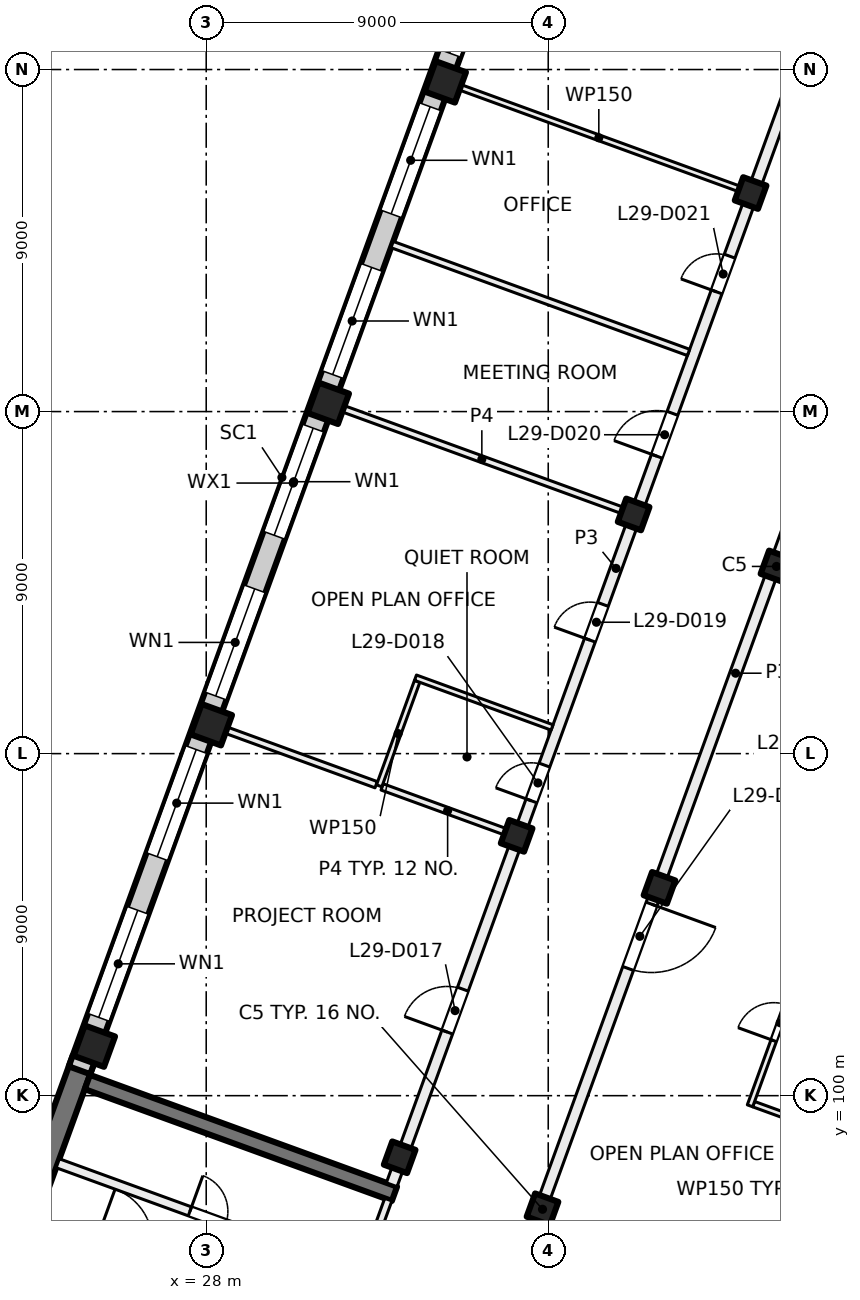
"""IFC4 building model, lengths in metres.
Left out: names, types, materials, properties, quantities, classifications, styles, units other than length and angle.
Written with IfcOpenShell. Run it as: python <this file> out.ifc"""

import sys

from ifc_helpers import new_model, si_unit, direction, frame, frame_2d, origin, origin_2d, place, context, subcontext, project, spatial, rectangle, extrude, element, fill, save


model = new_model("IFC4")
c1 = context("Model", 3, precision=1e-05, world=origin(), true_north=direction((0.0, 1.0)))
c2 = subcontext(c1, "Body", "Model", "MODEL_VIEW")
j1 = project(units=[si_unit("LENGTHUNIT", "METRE"), si_unit("PLANEANGLEUNIT", "RADIAN")], contexts=[c1])
p1 = place(None, origin())
s1 = spatial("IfcSite", under=j1, at=p1, CompositionType="ELEMENT")
p2 = place(p1, origin())
s2 = spatial("IfcBuilding", under=s1, at=p2, CompositionType="ELEMENT")
p3 = place(p2, frame((0.0, 0.0, 125.0)))
s3 = spatial("IfcBuildingStorey", under=s2, at=p3, CompositionType="ELEMENT", Elevation=125.0)
for number, where, z_axis, x_axis in (
    (1, (43.006, 113.925, 0.0), (0.0, 0.0, 1.0), (-0.342, -0.94, 0.0)),
    (2, (39.927, 105.468, 0.0), (0.0, 0.0, 1.0), (-0.342, -0.94, 0.0)),
    (3, (36.849, 97.011, 0.0), (0.0, 0.0, 1.0), (-0.342, -0.94, 0.0)),
    (4, (42.325, 123.751, 0.0), (0.0, 0.0, 1.0), (-0.342, -0.94, 0.0)),
    (5, (39.247, 115.293, 0.0), (0.0, 0.0, 1.0), (-0.342, -0.94, 0.0)),
    (6, (36.169, 106.836, 0.0), (0.0, 0.0, 1.0), (-0.342, -0.94, 0.0)),
    (7, (33.091, 98.379, 0.0), (0.0, 0.0, 1.0), (-0.342, -0.94, 0.0)),
):
    element("IfcColumn", number, at=place(p3, frame(where, z_axis=z_axis, x_axis=x_axis)), inside=s3, PredefinedType="COLUMN", context=c2, shape_type="SweptSolid", body=[
        extrude(rectangle(XDim=0.65, YDim=0.65, at=origin_2d()), origin(), (0.0, 0.0, 1.0), 4.0),
    ])
for number, where, z_axis, x_axis in (
    (8, (34.291, 126.675, 0.0), (0.0, 0.0, 1.0), (-0.342, -0.94, 0.0)),
    (9, (31.212, 118.218, 0.0), (0.0, 0.0, 1.0), (-0.342, -0.94, 0.0)),
    (10, (28.134, 109.76, 0.0), (0.0, 0.0, 1.0), (-0.342, -0.94, 0.0)),
    (11, (25.056, 101.303, 0.0), (0.0, 0.0, 1.0), (-0.342, -0.94, 0.0)),
):
    element("IfcColumn", number, at=place(p3, frame(where, z_axis=z_axis, x_axis=x_axis)), inside=s3, PredefinedType="COLUMN", context=c2, shape_type="SweptSolid", body=[
        extrude(rectangle(XDim=0.85, YDim=0.85, at=origin_2d()), origin(), (0.0, 0.0, 1.0), 4.0),
    ])
p4 = place(p3, frame((21.717, 92.568, 0.0), z_axis=(0.0, 0.0, 1.0), x_axis=(0.342017595281, 0.939693548195, 0.0)))
e12 = element("IfcWall", 12, at=p4, inside=s3, PredefinedType="SHEAR", context=c2, shape_type="SweptSolid", body=[
    extrude(rectangle(XDim=8.925, YDim=0.6, at=frame_2d((4.462, 0.0))), origin(), (0.0, 0.0, 1.0), 4.0),
])
p5 = place(p3, frame((32.953, 97.418, 0.0), z_axis=(0.0, 0.0, 1.0), x_axis=(-0.93969060187, 0.342025690201, 0.0)))
e13 = element("IfcWall", 13, at=p5, inside=s3, PredefinedType="SHEAR", context=c2, shape_type="SweptSolid", body=[
    extrude(rectangle(XDim=8.6, YDim=0.4, at=frame_2d((4.3, 0.0))), origin(), (0.0, 0.0, 1.0), 4.0),
])
p6 = place(p3, frame((24.666, 100.669, 0.0), z_axis=(0.0, 0.0, 1.0), x_axis=(0.34201964167, 0.939692803373, 0.0)))
e14 = element("IfcWall", 14, at=p6, inside=s3, PredefinedType="SOLIDWALL", context=c2, shape_type="SweptSolid", body=[
    extrude(rectangle(XDim=32.884, YDim=0.6, at=frame_2d((16.442, 0.0))), origin(), (0.0, 0.0, 1.0), 3.625),
])
p7 = place(p6, frame((1.48, 0.0, 0.9)))
e15 = element("IfcOpeningElement", 15, at=p7, cuts=e14, PredefinedType="OPENING", context=c2, shape_type="SweptSolid", body=[
    extrude(rectangle(XDim=3.0, YDim=2.4, at=frame_2d((1.5, 1.2))), frame((0.0, 0.31, 0.0), z_axis=(0.0, -1.0, 0.0), x_axis=(1.0, 0.0, 0.0)), (0.0, 0.0, 1.0), 0.62),
])
p8 = place(p6, frame((5.98, 0.0, 0.9)))
e16 = element("IfcOpeningElement", 16, at=p8, cuts=e14, PredefinedType="OPENING", context=c2, shape_type="SweptSolid", body=[
    extrude(rectangle(XDim=3.0, YDim=2.4, at=frame_2d((1.5, 1.2))), frame((0.0, 0.31, 0.0), z_axis=(0.0, -1.0, 0.0), x_axis=(1.0, 0.0, 0.0)), (0.0, 0.0, 1.0), 0.62),
])
p9 = place(p6, frame((10.48, 0.0, 0.9)))
e17 = element("IfcOpeningElement", 17, at=p9, cuts=e14, PredefinedType="OPENING", context=c2, shape_type="SweptSolid", body=[
    extrude(rectangle(XDim=3.0, YDim=2.4, at=frame_2d((1.5, 1.2))), frame((0.0, 0.31, 0.0), z_axis=(0.0, -1.0, 0.0), x_axis=(1.0, 0.0, 0.0)), (0.0, 0.0, 1.0), 0.62),
])
p10 = place(p6, frame((14.98, 0.0, 0.9)))
e18 = element("IfcOpeningElement", 18, at=p10, cuts=e14, PredefinedType="OPENING", context=c2, shape_type="SweptSolid", body=[
    extrude(rectangle(XDim=3.0, YDim=2.4, at=frame_2d((1.5, 1.2))), frame((0.0, 0.31, 0.0), z_axis=(0.0, -1.0, 0.0), x_axis=(1.0, 0.0, 0.0)), (0.0, 0.0, 1.0), 0.62),
])
p11 = place(p6, frame((19.48, 0.0, 0.9)))
e19 = element("IfcOpeningElement", 19, at=p11, cuts=e14, PredefinedType="OPENING", context=c2, shape_type="SweptSolid", body=[
    extrude(rectangle(XDim=3.0, YDim=2.4, at=frame_2d((1.5, 1.2))), frame((0.0, 0.31, 0.0), z_axis=(0.0, -1.0, 0.0), x_axis=(1.0, 0.0, 0.0)), (0.0, 0.0, 1.0), 0.62),
])
p12 = place(p6, frame((23.98, 0.0, 0.9)))
e20 = element("IfcOpeningElement", 20, at=p12, cuts=e14, PredefinedType="OPENING", context=c2, shape_type="SweptSolid", body=[
    extrude(rectangle(XDim=3.0, YDim=2.4, at=frame_2d((1.5, 1.2))), frame((0.0, 0.31, 0.0), z_axis=(0.0, -1.0, 0.0), x_axis=(1.0, 0.0, 0.0)), (0.0, 0.0, 1.0), 0.62),
])
p13 = place(p6, frame((28.48, 0.0, 0.9)))
e21 = element("IfcOpeningElement", 21, at=p13, cuts=e14, PredefinedType="OPENING", context=c2, shape_type="SweptSolid", body=[
    extrude(rectangle(XDim=3.0, YDim=2.4, at=frame_2d((1.5, 1.2))), frame((0.0, 0.31, 0.0), z_axis=(0.0, -1.0, 0.0), x_axis=(1.0, 0.0, 0.0)), (0.0, 0.0, 1.0), 0.62),
])
p14 = place(p3, frame((31.491, 93.693, 0.0), z_axis=(0.0, 0.0, 1.0), x_axis=(0.341995824804, 0.939701471648, 0.0)))
e22 = element("IfcWall", 22, at=p14, inside=s3, PredefinedType="PARTITIONING", context=c2, shape_type="SweptSolid", body=[
    extrude(rectangle(XDim=3.8, YDim=0.2, at=frame_2d((1.9, 0.0))), origin(), (0.0, 0.0, 1.0), 3.625),
])
p15 = place(p14, frame((0.3, 0.0, 0.0)))
e23 = element("IfcOpeningElement", 23, at=p15, cuts=e22, PredefinedType="OPENING", context=c2, shape_type="SweptSolid", body=[
    extrude(rectangle(XDim=1.2, YDim=2.1, at=frame_2d((0.6, 1.05))), frame((0.0, 0.11, 0.0), z_axis=(0.0, -1.0, 0.0), x_axis=(1.0, 0.0, 0.0)), (0.0, 0.0, 1.0), 0.22),
])
p16 = place(p3, frame((23.538, 96.694, 0.0), z_axis=(0.0, 0.0, 1.0), x_axis=(0.939691552312, -0.342023078919, 0.0)))
e24 = element("IfcWall", 24, at=p16, inside=s3, PredefinedType="PARTITIONING", context=c2, shape_type="SweptSolid", body=[
    extrude(rectangle(XDim=8.4, YDim=0.2, at=frame_2d((4.2, 0.0))), origin(), (0.0, 0.0, 1.0), 3.625),
])
p17 = place(p16, frame((1.65, 0.0, 0.0)))
e25 = element("IfcOpeningElement", 25, at=p17, cuts=e24, PredefinedType="OPENING", context=c2, shape_type="SweptSolid", body=[
    extrude(rectangle(XDim=1.5, YDim=2.1, at=frame_2d((0.75, 1.05))), frame((0.0, 0.11, 0.0), z_axis=(0.0, -1.0, 0.0), x_axis=(1.0, 0.0, 0.0)), (0.0, 0.0, 1.0), 0.22),
])
p18 = place(p3, frame((24.094, 98.221, 0.0), z_axis=(0.0, 0.0, 1.0), x_axis=(0.939691552312, -0.342023078919, 0.0)))
e26 = element("IfcWall", 26, at=p18, inside=s3, PredefinedType="PARTITIONING", context=c2, shape_type="SweptSolid", body=[
    extrude(rectangle(XDim=8.4, YDim=0.25, at=frame_2d((4.2, 0.0))), origin(), (0.0, 0.0, 1.0), 3.625),
])
p19 = place(p18, frame((3.7, 0.0, 0.0)))
e27 = element("IfcOpeningElement", 27, at=p19, cuts=e26, PredefinedType="OPENING", context=c2, shape_type="SweptSolid", body=[
    extrude(rectangle(XDim=1.0, YDim=2.1, at=frame_2d((0.5, 1.05))), frame((0.0, 0.135, 0.0), z_axis=(0.0, -1.0, 0.0), x_axis=(1.0, 0.0, 0.0)), (0.0, 0.0, 1.0), 0.27),
])
p20 = place(p3, frame((28.275, 109.709, 0.0), z_axis=(0.0, 0.0, 1.0), x_axis=(0.939727969122, -0.34192300895, 0.0)))
e28 = element("IfcWall", 28, at=p20, inside=s3, PredefinedType="PARTITIONING", context=c2, shape_type="SweptSolid", body=[
    extrude(rectangle(XDim=4.466, YDim=0.175, at=frame_2d((2.233, 0.0))), origin(), (0.0, 0.0, 1.0), 3.625),
])
p21 = place(p3, frame((31.353, 118.166, 0.0), z_axis=(0.0, 0.0, 1.0), x_axis=(0.939687752599, -0.342033518263, 0.0)))
e29 = element("IfcWall", 29, at=p21, inside=s3, PredefinedType="PARTITIONING", context=c2, shape_type="SweptSolid", body=[
    extrude(rectangle(XDim=8.301, YDim=0.175, at=frame_2d((4.15, 0.0))), origin(), (0.0, 0.0, 1.0), 3.625),
])
p22 = place(p3, frame((32.63, 108.124, 0.0), z_axis=(0.0, 0.0, 1.0), x_axis=(0.939692277825, -0.342021085601, 0.0)))
e30 = element("IfcWall", 30, at=p22, inside=s3, PredefinedType="PARTITIONING", context=c2, shape_type="SweptSolid", body=[
    extrude(rectangle(XDim=3.666, YDim=0.175, at=frame_2d((1.833, 0.0))), origin(), (0.0, 0.0, 1.0), 3.625),
])
p23 = place(p3, frame((32.551, 108.153, 0.0), z_axis=(0.0, 0.0, 1.0), x_axis=(0.341850278959, 0.939754428974, 0.0)))
e31 = element("IfcWall", 31, at=p23, inside=s3, PredefinedType="PARTITIONING", context=c2, shape_type="SweptSolid", body=[
    extrude(rectangle(XDim=2.925, YDim=0.15, at=frame_2d((1.463, 0.0))), origin(), (0.0, 0.0, 1.0), 3.625),
])
p24 = place(p3, frame((32.881, 97.657, 0.0), z_axis=(0.0, 0.0, 1.0), x_axis=(0.342017360004, 0.939693633828, 0.0)))
e32 = element("IfcWall", 32, at=p24, inside=s3, PredefinedType="PARTITIONING", context=c2, shape_type="SweptSolid", body=[
    extrude(rectangle(XDim=34.516, YDim=0.3, at=frame_2d((17.258, 0.0))), origin(), (0.0, 0.0, 1.0), 3.625),
])
p25 = place(p24, frame((4.275, 0.0, 0.0)))
e33 = element("IfcOpeningElement", 33, at=p25, cuts=e32, PredefinedType="OPENING", context=c2, shape_type="SweptSolid", body=[
    extrude(rectangle(XDim=1.2, YDim=2.1, at=frame_2d((0.6, 1.05))), frame((0.0, 0.16, 0.0), z_axis=(0.0, -1.0, 0.0), x_axis=(1.0, 0.0, 0.0)), (0.0, 0.0, 1.0), 0.32),
])
p26 = place(p24, frame((10.75, 0.0, 0.0)))
e34 = element("IfcOpeningElement", 34, at=p26, cuts=e32, PredefinedType="OPENING", context=c2, shape_type="SweptSolid", body=[
    extrude(rectangle(XDim=1.0, YDim=2.1, at=frame_2d((0.5, 1.05))), frame((0.0, 0.16, 0.0), z_axis=(0.0, -1.0, 0.0), x_axis=(1.0, 0.0, 0.0)), (0.0, 0.0, 1.0), 0.32),
])
p27 = place(p24, frame((15.25, 0.0, 0.0)))
e35 = element("IfcOpeningElement", 35, at=p27, cuts=e32, PredefinedType="OPENING", context=c2, shape_type="SweptSolid", body=[
    extrude(rectangle(XDim=1.0, YDim=2.1, at=frame_2d((0.5, 1.05))), frame((0.0, 0.16, 0.0), z_axis=(0.0, -1.0, 0.0), x_axis=(1.0, 0.0, 0.0)), (0.0, 0.0, 1.0), 0.32),
])
p28 = place(p24, frame((20.4, 0.0, 0.0)))
e36 = element("IfcOpeningElement", 36, at=p28, cuts=e32, PredefinedType="OPENING", context=c2, shape_type="SweptSolid", body=[
    extrude(rectangle(XDim=1.2, YDim=2.1, at=frame_2d((0.6, 1.05))), frame((0.0, 0.16, 0.0), z_axis=(0.0, -1.0, 0.0), x_axis=(1.0, 0.0, 0.0)), (0.0, 0.0, 1.0), 0.32),
])
p29 = place(p24, frame((25.0, 0.0, 0.0)))
e37 = element("IfcOpeningElement", 37, at=p29, cuts=e32, PredefinedType="OPENING", context=c2, shape_type="SweptSolid", body=[
    extrude(rectangle(XDim=1.0, YDim=2.1, at=frame_2d((0.5, 1.05))), frame((0.0, 0.16, 0.0), z_axis=(0.0, -1.0, 0.0), x_axis=(1.0, 0.0, 0.0)), (0.0, 0.0, 1.0), 0.32),
])
p30 = place(p3, frame((32.892, 122.395, 0.0), z_axis=(0.0, 0.0, 1.0), x_axis=(0.939684311623, -0.3420429717, 0.0)))
e38 = element("IfcWall", 38, at=p30, inside=s3, PredefinedType="PARTITIONING", context=c2, shape_type="SweptSolid", body=[
    extrude(rectangle(XDim=8.301, YDim=0.175, at=frame_2d((4.15, 0.0))), origin(), (0.0, 0.0, 1.0), 3.625),
])
p31 = place(p3, frame((33.507, 110.998, 0.0), z_axis=(0.0, 0.0, 1.0), x_axis=(0.939610657605, -0.342245251415, 0.0)))
e39 = element("IfcWall", 39, at=p31, inside=s3, PredefinedType="PARTITIONING", context=c2, shape_type="SweptSolid", body=[
    extrude(rectangle(XDim=3.825, YDim=0.15, at=frame_2d((1.913, 0.0))), origin(), (0.0, 0.0, 1.0), 3.625),
])
p32 = place(p3, frame((46.282, 98.367, 0.0), z_axis=(0.0, 0.0, 1.0), x_axis=(-0.939765774653, 0.341819087808, 0.0)))
e40 = element("IfcWall", 40, at=p32, inside=s3, PredefinedType="PARTITIONING", context=c2, shape_type="SweptSolid", body=[
    extrude(rectangle(XDim=4.125, YDim=0.15, at=frame_2d((2.063, 0.0))), origin(), (0.0, 0.0, 1.0), 3.625),
])
p33 = place(p3, frame((42.309, 99.733, 0.0), z_axis=(0.0, 0.0, 1.0), x_axis=(0.342023551531, 0.939691380293, 0.0)))
e41 = element("IfcWall", 41, at=p33, inside=s3, PredefinedType="PARTITIONING", context=c2, shape_type="SweptSolid", body=[
    extrude(rectangle(XDim=13.488, YDim=0.15, at=frame_2d((6.744, 0.0))), origin(), (0.0, 0.0, 1.0), 3.625),
])
p34 = place(p33, frame((1.825, 0.0, 0.0)))
e42 = element("IfcOpeningElement", 42, at=p34, cuts=e41, PredefinedType="OPENING", context=c2, shape_type="SweptSolid", body=[
    extrude(rectangle(XDim=1.0, YDim=2.1, at=frame_2d((0.5, 1.05))), frame((0.0, 0.085, 0.0), z_axis=(0.0, -1.0, 0.0), x_axis=(1.0, 0.0, 0.0)), (0.0, 0.0, 1.0), 0.17),
])
p35 = place(p33, frame((6.325, 0.0, 0.0)))
e43 = element("IfcOpeningElement", 43, at=p35, cuts=e41, PredefinedType="OPENING", context=c2, shape_type="SweptSolid", body=[
    extrude(rectangle(XDim=1.0, YDim=2.1, at=frame_2d((0.5, 1.05))), frame((0.0, 0.085, 0.0), z_axis=(0.0, -1.0, 0.0), x_axis=(1.0, 0.0, 0.0)), (0.0, 0.0, 1.0), 0.17),
])
p36 = place(p33, frame((10.791, 0.0, 0.0)))
e44 = element("IfcOpeningElement", 44, at=p36, cuts=e41, PredefinedType="OPENING", context=c2, shape_type="SweptSolid", body=[
    extrude(rectangle(XDim=1.0, YDim=2.1, at=frame_2d((0.5, 1.05))), frame((0.0, 0.085, 0.0), z_axis=(0.0, -1.0, 0.0), x_axis=(1.0, 0.0, 0.0)), (0.0, 0.0, 1.0), 0.17),
])
p37 = place(p3, frame((42.231, 123.785, 0.0), z_axis=(0.0, 0.0, 1.0), x_axis=(-0.939687752599, 0.342033518263, 0.0)))
e45 = element("IfcWall", 45, at=p37, inside=s3, PredefinedType="PARTITIONING", context=c2, shape_type="SweptSolid", body=[
    extrude(rectangle(XDim=8.301, YDim=0.15, at=frame_2d((4.15, 0.0))), origin(), (0.0, 0.0, 1.0), 3.625),
])
p38 = place(p3, frame((43.1, 113.891, 0.0), z_axis=(0.0, 0.0, 1.0), x_axis=(0.939670544866, -0.342080790328, 0.0)))
e46 = element("IfcWall", 46, at=p38, inside=s3, PredefinedType="PARTITIONING", context=c2, shape_type="SweptSolid", body=[
    extrude(rectangle(XDim=8.3, YDim=0.175, at=frame_2d((4.15, 0.0))), origin(), (0.0, 0.0, 1.0), 3.625),
])
p39 = place(p3, frame((47.314, 125.909, 0.0), z_axis=(0.0, 0.0, 1.0), x_axis=(-0.342010770371, -0.939696032209, 0.0)))
e47 = element("IfcWall", 47, at=p39, inside=s3, PredefinedType="PARTITIONING", context=c2, shape_type="SweptSolid", body=[
    extrude(rectangle(XDim=31.485, YDim=0.3, at=frame_2d((15.742, 0.0))), origin(), (0.0, 0.0, 1.0), 3.625),
])
p40 = place(p39, frame((22.21, 0.0, 0.0)))
e48 = element("IfcOpeningElement", 48, at=p40, cuts=e47, PredefinedType="OPENING", context=c2, shape_type="SweptSolid", body=[
    extrude(rectangle(XDim=1.8, YDim=2.1, at=frame_2d((0.9, 1.05))), frame((0.0, 0.16, 0.0), z_axis=(0.0, -1.0, 0.0), x_axis=(1.0, 0.0, 0.0)), (0.0, 0.0, 1.0), 0.32),
])
p41 = place(p39, frame((9.885, 0.0, 0.0)))
e49 = element("IfcOpeningElement", 49, at=p41, cuts=e47, PredefinedType="OPENING", context=c2, shape_type="SweptSolid", body=[
    extrude(rectangle(XDim=1.2, YDim=2.1, at=frame_2d((0.6, 1.05))), frame((0.0, 0.16, 0.0), z_axis=(0.0, -1.0, 0.0), x_axis=(1.0, 0.0, 0.0)), (0.0, 0.0, 1.0), 0.32),
])
p42 = place(p39, frame((5.484, 0.0, 0.0)))
e50 = element("IfcOpeningElement", 50, at=p42, cuts=e47, PredefinedType="OPENING", context=c2, shape_type="SweptSolid", body=[
    extrude(rectangle(XDim=1.0, YDim=2.1, at=frame_2d((0.5, 1.05))), frame((0.0, 0.16, 0.0), z_axis=(0.0, -1.0, 0.0), x_axis=(1.0, 0.0, 0.0)), (0.0, 0.0, 1.0), 0.32),
])
p43 = place(p7, origin())
e51 = element("IfcWindow", 51, at=p43, inside=s3, PartitioningType="SINGLE_PANEL", PredefinedType="WINDOW", context=c2, shape_type="SweptSolid", body=[
    extrude(rectangle(XDim=3.0, YDim=2.4, at=frame_2d((1.5, 1.2))), frame((0.0, 0.03, 0.0), z_axis=(0.0, -1.0, 0.0), x_axis=(1.0, 0.0, 0.0)), (0.0, 0.0, 1.0), 0.06),
])
fill(e15, e51)
p44 = place(p8, origin())
e52 = element("IfcWindow", 52, at=p44, inside=s3, PartitioningType="SINGLE_PANEL", PredefinedType="WINDOW", context=c2, shape_type="SweptSolid", body=[
    extrude(rectangle(XDim=3.0, YDim=2.4, at=frame_2d((1.5, 1.2))), frame((0.0, 0.03, 0.0), z_axis=(0.0, -1.0, 0.0), x_axis=(1.0, 0.0, 0.0)), (0.0, 0.0, 1.0), 0.06),
])
fill(e16, e52)
p45 = place(p9, origin())
e53 = element("IfcWindow", 53, at=p45, inside=s3, PartitioningType="SINGLE_PANEL", PredefinedType="WINDOW", context=c2, shape_type="SweptSolid", body=[
    extrude(rectangle(XDim=3.0, YDim=2.4, at=frame_2d((1.5, 1.2))), frame((0.0, 0.03, 0.0), z_axis=(0.0, -1.0, 0.0), x_axis=(1.0, 0.0, 0.0)), (0.0, 0.0, 1.0), 0.06),
])
fill(e17, e53)
p46 = place(p10, origin())
e54 = element("IfcWindow", 54, at=p46, inside=s3, PartitioningType="SINGLE_PANEL", PredefinedType="WINDOW", context=c2, shape_type="SweptSolid", body=[
    extrude(rectangle(XDim=3.0, YDim=2.4, at=frame_2d((1.5, 1.2))), frame((0.0, 0.03, 0.0), z_axis=(0.0, -1.0, 0.0), x_axis=(1.0, 0.0, 0.0)), (0.0, 0.0, 1.0), 0.06),
])
fill(e18, e54)
p47 = place(p11, origin())
e55 = element("IfcWindow", 55, at=p47, inside=s3, PartitioningType="SINGLE_PANEL", PredefinedType="WINDOW", context=c2, shape_type="SweptSolid", body=[
    extrude(rectangle(XDim=3.0, YDim=2.4, at=frame_2d((1.5, 1.2))), frame((0.0, 0.03, 0.0), z_axis=(0.0, -1.0, 0.0), x_axis=(1.0, 0.0, 0.0)), (0.0, 0.0, 1.0), 0.06),
])
fill(e19, e55)
p48 = place(p12, origin())
e56 = element("IfcWindow", 56, at=p48, inside=s3, PartitioningType="SINGLE_PANEL", PredefinedType="WINDOW", context=c2, shape_type="SweptSolid", body=[
    extrude(rectangle(XDim=3.0, YDim=2.4, at=frame_2d((1.5, 1.2))), frame((0.0, 0.03, 0.0), z_axis=(0.0, -1.0, 0.0), x_axis=(1.0, 0.0, 0.0)), (0.0, 0.0, 1.0), 0.06),
])
fill(e20, e56)
p49 = place(p13, origin())
e57 = element("IfcWindow", 57, at=p49, inside=s3, PartitioningType="SINGLE_PANEL", PredefinedType="WINDOW", context=c2, shape_type="SweptSolid", body=[
    extrude(rectangle(XDim=3.0, YDim=2.4, at=frame_2d((1.5, 1.2))), frame((0.0, 0.03, 0.0), z_axis=(0.0, -1.0, 0.0), x_axis=(1.0, 0.0, 0.0)), (0.0, 0.0, 1.0), 0.06),
])
fill(e21, e57)
p50 = place(p19, origin())
e58 = element("IfcDoor", 58, at=p50, inside=s3, OperationType="SINGLE_SWING_LEFT", PredefinedType="DOOR", context=c2, shape_type="SweptSolid", body=[
    extrude(rectangle(XDim=1.0, YDim=2.1, at=frame_2d((0.5, 1.05))), frame((0.0, 0.025, 0.0), z_axis=(0.0, -1.0, 0.0), x_axis=(1.0, 0.0, 0.0)), (0.0, 0.0, 1.0), 0.05),
])
fill(e27, e58)
p51 = place(p25, origin())
e59 = element("IfcDoor", 59, at=p51, inside=s3, OperationType="DOUBLE_DOOR_SINGLE_SWING", PredefinedType="DOOR", context=c2, shape_type="SweptSolid", body=[
    extrude(rectangle(XDim=1.2, YDim=2.1, at=frame_2d((0.6, 1.05))), frame((0.0, 0.025, 0.0), z_axis=(0.0, -1.0, 0.0), x_axis=(1.0, 0.0, 0.0)), (0.0, 0.0, 1.0), 0.05),
])
fill(e33, e59)
p52 = place(p26, origin())
e60 = element("IfcDoor", 60, at=p52, inside=s3, OperationType="SINGLE_SWING_RIGHT", PredefinedType="DOOR", context=c2, shape_type="SweptSolid", body=[
    extrude(rectangle(XDim=1.0, YDim=2.1, at=frame_2d((0.5, 1.05))), frame((0.0, 0.025, 0.0), z_axis=(0.0, -1.0, 0.0), x_axis=(1.0, 0.0, 0.0)), (0.0, 0.0, 1.0), 0.05),
])
fill(e34, e60)
p53 = place(p27, origin())
e61 = element("IfcDoor", 61, at=p53, inside=s3, OperationType="SINGLE_SWING_LEFT", PredefinedType="DOOR", context=c2, shape_type="SweptSolid", body=[
    extrude(rectangle(XDim=1.0, YDim=2.1, at=frame_2d((0.5, 1.05))), frame((0.0, 0.025, 0.0), z_axis=(0.0, -1.0, 0.0), x_axis=(1.0, 0.0, 0.0)), (0.0, 0.0, 1.0), 0.05),
])
fill(e35, e61)
p54 = place(p28, origin())
e62 = element("IfcDoor", 62, at=p54, inside=s3, OperationType="DOUBLE_DOOR_SINGLE_SWING", PredefinedType="DOOR", context=c2, shape_type="SweptSolid", body=[
    extrude(rectangle(XDim=1.2, YDim=2.1, at=frame_2d((0.6, 1.05))), frame((0.0, 0.025, 0.0), z_axis=(0.0, -1.0, 0.0), x_axis=(1.0, 0.0, 0.0)), (0.0, 0.0, 1.0), 0.05),
])
fill(e36, e62)
p55 = place(p29, origin())
e63 = element("IfcDoor", 63, at=p55, inside=s3, OperationType="SINGLE_SWING_RIGHT", PredefinedType="DOOR", context=c2, shape_type="SweptSolid", body=[
    extrude(rectangle(XDim=1.0, YDim=2.1, at=frame_2d((0.5, 1.05))), frame((0.0, 0.025, 0.0), z_axis=(0.0, -1.0, 0.0), x_axis=(1.0, 0.0, 0.0)), (0.0, 0.0, 1.0), 0.05),
])
fill(e37, e63)
p56 = place(p34, origin())
e64 = element("IfcDoor", 64, at=p56, inside=s3, OperationType="SINGLE_SWING_LEFT", PredefinedType="DOOR", context=c2, shape_type="SweptSolid", body=[
    extrude(rectangle(XDim=1.0, YDim=2.1, at=frame_2d((0.5, 1.05))), frame((0.0, 0.025, 0.0), z_axis=(0.0, -1.0, 0.0), x_axis=(1.0, 0.0, 0.0)), (0.0, 0.0, 1.0), 0.05),
])
fill(e42, e64)
p57 = place(p40, origin())
e65 = element("IfcDoor", 65, at=p57, inside=s3, OperationType="DOUBLE_DOOR_SINGLE_SWING", PredefinedType="DOOR", context=c2, shape_type="SweptSolid", body=[
    extrude(rectangle(XDim=1.8, YDim=2.1, at=frame_2d((0.9, 1.05))), frame((0.0, 0.025, 0.0), z_axis=(0.0, -1.0, 0.0), x_axis=(1.0, 0.0, 0.0)), (0.0, 0.0, 1.0), 0.05),
])
fill(e48, e65)
save(model, sys.argv[1])
